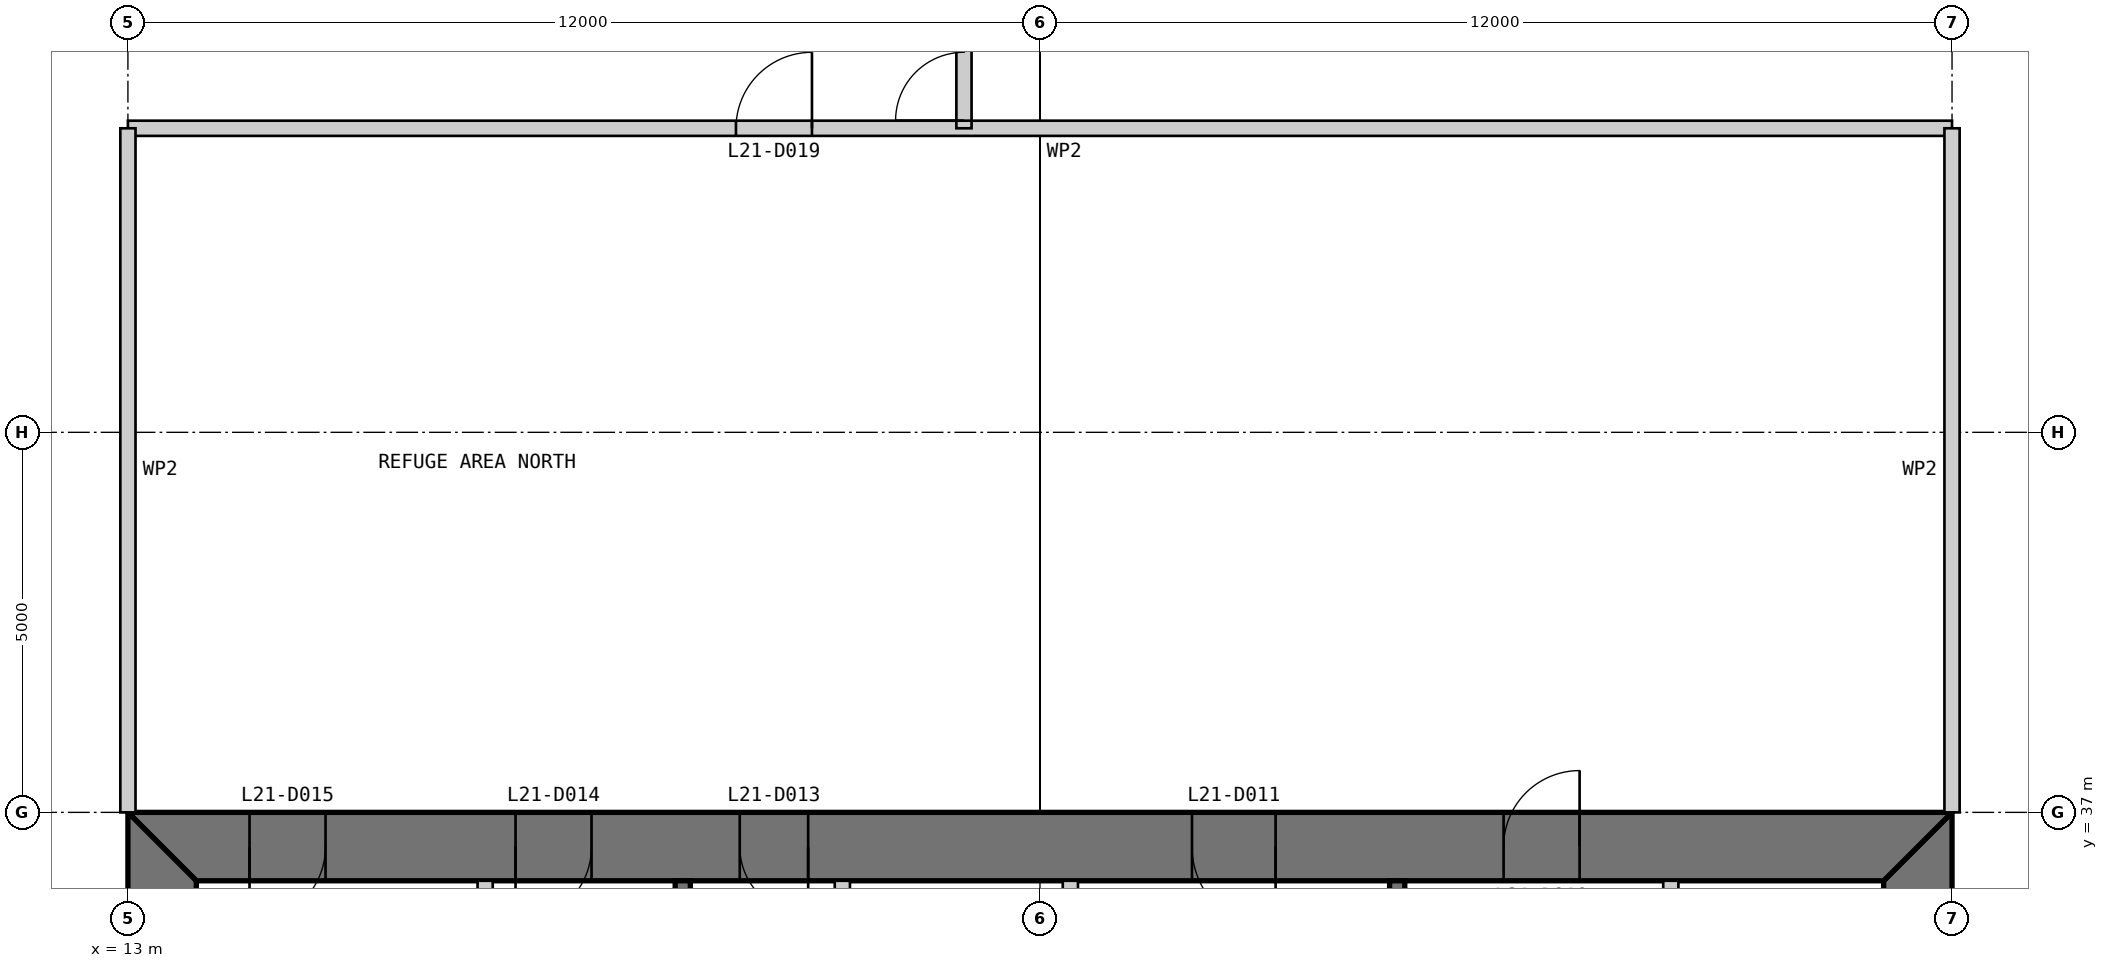
"""IFC4 building model, lengths in metres.
Left out: names, types, materials, properties, quantities, classifications, styles, units other than length and angle.
Written with IfcOpenShell. Run it as: python <this file> out.ifc"""

import sys

from ifc_helpers import new_model, si_unit, direction, frame, frame_2d, origin, place, context, subcontext, project, spatial, polyline, rectangle, outline, extrude, element, fill, save


model = new_model("IFC4")
c1 = context("Model", 3, precision=1e-05, world=origin(), true_north=direction((0.0, 1.0)))
c2 = subcontext(c1, "Body", "Model", "MODEL_VIEW")
j1 = project(units=[si_unit("LENGTHUNIT", "METRE"), si_unit("PLANEANGLEUNIT", "RADIAN")], contexts=[c1])
p1 = place(None, origin())
s1 = spatial("IfcSite", under=j1, at=p1, CompositionType="ELEMENT")
p2 = place(p1, origin())
s2 = spatial("IfcBuilding", under=s1, at=p2, CompositionType="ELEMENT")
p3 = place(p2, frame((0.0, 0.0, 91.0)))
s3 = spatial("IfcBuildingStorey", under=s2, at=p3, CompositionType="ELEMENT", Elevation=91.0)
p4 = place(p3, frame((36.55, 13.9, 0.0), z_axis=(0.0, 0.0, 1.0), x_axis=(0.0, 1.0, 0.0)))
e1 = element("IfcWall", 1, at=p4, inside=s3, PredefinedType="SHEAR", context=c2, shape_type="SweptSolid", body=[
    extrude(outline(polyline([(-0.9, -0.45), (23.1, -0.45), (22.2, 0.45), (0.0, 0.45), (-0.9, -0.45)])), origin(), (0.0, 0.0, 1.0), 6.0),
])
p5 = place(p4, frame((20.2, 0.0, 0.0)))
e2 = element("IfcOpeningElement", 2, at=p5, cuts=e1, PredefinedType="OPENING", context=c2, shape_type="SweptSolid", body=[
    extrude(rectangle(XDim=1.0, YDim=2.2, at=frame_2d((0.5, 1.1))), frame((0.0, 0.46, 0.0), z_axis=(0.0, -1.0, 0.0), x_axis=(1.0, 0.0, 0.0)), (0.0, 0.0, 1.0), 0.92),
])
p6 = place(p4, frame((17.25, 0.0, 0.0)))
e3 = element("IfcOpeningElement", 3, at=p6, cuts=e1, PredefinedType="OPENING", context=c2, shape_type="SweptSolid", body=[
    extrude(rectangle(XDim=0.9, YDim=2.2, at=frame_2d((0.45, 1.1))), frame((0.0, 0.46, 0.0), z_axis=(0.0, -1.0, 0.0), x_axis=(1.0, 0.0, 0.0)), (0.0, 0.0, 1.0), 0.92),
])
p7 = place(p3, frame((37.0, 36.55, 0.0), z_axis=(0.0, 0.0, 1.0), x_axis=(-1.0, 0.0, 0.0)))
e4 = element("IfcWall", 4, at=p7, inside=s3, PredefinedType="SHEAR", context=c2, shape_type="SweptSolid", body=[
    extrude(outline(polyline([(0.0, -0.45), (24.0, -0.45), (23.1, 0.45), (0.9, 0.45), (0.0, -0.45)])), origin(), (0.0, 0.0, 1.0), 6.0),
])
p8 = place(p7, frame((4.9, 0.0, 0.0)))
e5 = element("IfcOpeningElement", 5, at=p8, cuts=e4, PredefinedType="OPENING", context=c2, shape_type="SweptSolid", body=[
    extrude(rectangle(XDim=1.0, YDim=2.2, at=frame_2d((0.5, 1.1))), frame((0.0, 0.46, 0.0), z_axis=(0.0, -1.0, 0.0), x_axis=(1.0, 0.0, 0.0)), (0.0, 0.0, 1.0), 0.92),
])
p9 = place(p7, frame((8.9, 0.0, 0.0)))
e6 = element("IfcOpeningElement", 6, at=p9, cuts=e4, PredefinedType="OPENING", context=c2, shape_type="SweptSolid", body=[
    extrude(rectangle(XDim=1.1, YDim=2.2, at=frame_2d((0.55, 1.1))), frame((0.0, 0.46, 0.0), z_axis=(0.0, -1.0, 0.0), x_axis=(1.0, 0.0, 0.0)), (0.0, 0.0, 1.0), 0.92),
])
p10 = place(p7, frame((15.05, 0.0, 0.0)))
e7 = element("IfcOpeningElement", 7, at=p10, cuts=e4, PredefinedType="OPENING", context=c2, shape_type="SweptSolid", body=[
    extrude(rectangle(XDim=0.9, YDim=2.2, at=frame_2d((0.45, 1.1))), frame((0.0, 0.46, 0.0), z_axis=(0.0, -1.0, 0.0), x_axis=(1.0, 0.0, 0.0)), (0.0, 0.0, 1.0), 0.92),
])
p11 = place(p7, frame((17.9, 0.0, 0.0)))
e8 = element("IfcOpeningElement", 8, at=p11, cuts=e4, PredefinedType="OPENING", context=c2, shape_type="SweptSolid", body=[
    extrude(rectangle(XDim=1.0, YDim=2.2, at=frame_2d((0.5, 1.1))), frame((0.0, 0.46, 0.0), z_axis=(0.0, -1.0, 0.0), x_axis=(1.0, 0.0, 0.0)), (0.0, 0.0, 1.0), 0.92),
])
p12 = place(p7, frame((21.4, 0.0, 0.0)))
e9 = element("IfcOpeningElement", 9, at=p12, cuts=e4, PredefinedType="OPENING", context=c2, shape_type="SweptSolid", body=[
    extrude(rectangle(XDim=1.0, YDim=2.2, at=frame_2d((0.5, 1.1))), frame((0.0, 0.46, 0.0), z_axis=(0.0, -1.0, 0.0), x_axis=(1.0, 0.0, 0.0)), (0.0, 0.0, 1.0), 0.92),
])
p13 = place(p3, frame((13.45, 36.1, 0.0), z_axis=(0.0, 0.0, 1.0), x_axis=(0.0, -1.0, 0.0)))
e10 = element("IfcWall", 10, at=p13, inside=s3, PredefinedType="SHEAR", context=c2, shape_type="SweptSolid", body=[
    extrude(outline(polyline([(-0.9, -0.45), (23.1, -0.45), (22.2, 0.45), (0.0, 0.45), (-0.9, -0.45)])), origin(), (0.0, 0.0, 1.0), 6.0),
])
p14 = place(p13, frame((20.2, 0.0, 0.0)))
e11 = element("IfcOpeningElement", 11, at=p14, cuts=e10, PredefinedType="OPENING", context=c2, shape_type="SweptSolid", body=[
    extrude(rectangle(XDim=1.0, YDim=2.2, at=frame_2d((0.5, 1.1))), frame((0.0, 0.46, 0.0), z_axis=(0.0, -1.0, 0.0), x_axis=(1.0, 0.0, 0.0)), (0.0, 0.0, 1.0), 0.92),
])
p15 = place(p13, frame((17.25, 0.0, 0.0)))
e12 = element("IfcOpeningElement", 12, at=p15, cuts=e10, PredefinedType="OPENING", context=c2, shape_type="SweptSolid", body=[
    extrude(rectangle(XDim=0.9, YDim=2.2, at=frame_2d((0.45, 1.1))), frame((0.0, 0.46, 0.0), z_axis=(0.0, -1.0, 0.0), x_axis=(1.0, 0.0, 0.0)), (0.0, 0.0, 1.0), 0.92),
])
p16 = place(p3, frame((33.3, 36.1, 0.0), z_axis=(0.0, 0.0, 1.0), x_axis=(0.0, -1.0, 0.0)))
e13 = element("IfcWall", 13, at=p16, inside=s3, PredefinedType="PARTITIONING", context=c2, shape_type="SweptSolid", body=[
    extrude(rectangle(XDim=16.1, YDim=0.2, at=frame_2d((8.05, 0.0))), origin(), (0.0, 0.0, 1.0), 5.8),
])
p17 = place(p16, frame((4.1, 0.0, 0.0)))
e14 = element("IfcOpeningElement", 14, at=p17, cuts=e13, PredefinedType="OPENING", context=c2, shape_type="SweptSolid", body=[
    extrude(rectangle(XDim=0.9, YDim=2.2, at=frame_2d((0.45, 1.1))), frame((0.0, 0.11, 0.0), z_axis=(0.0, -1.0, 0.0), x_axis=(1.0, 0.0, 0.0)), (0.0, 0.0, 1.0), 0.22),
])
p18 = place(p3, frame((29.7, 36.1, 0.0), z_axis=(0.0, 0.0, 1.0), x_axis=(0.0, -1.0, 0.0)))
e15 = element("IfcWall", 15, at=p18, inside=s3, PredefinedType="SOLIDWALL", context=c2, shape_type="SweptSolid", body=[
    extrude(rectangle(XDim=16.1, YDim=0.2, at=frame_2d((8.05, 0.0))), origin(), (0.0, 0.0, 1.0), 5.8),
])
p19 = place(p3, frame((25.4, 36.1, 0.0), z_axis=(0.0, 0.0, 1.0), x_axis=(0.0, -1.0, 0.0)))
e16 = element("IfcWall", 16, at=p19, inside=s3, PredefinedType="PARTITIONING", context=c2, shape_type="SweptSolid", body=[
    extrude(rectangle(XDim=3.3, YDim=0.2, at=frame_2d((1.65, 0.0))), origin(), (0.0, 0.0, 1.0), 5.8),
])
p20 = place(p19, frame((0.9, 0.0, 0.0)))
e17 = element("IfcOpeningElement", 17, at=p20, cuts=e16, PredefinedType="OPENING", context=c2, shape_type="SweptSolid", body=[
    extrude(rectangle(XDim=1.1, YDim=2.2, at=frame_2d((0.55, 1.1))), frame((0.0, 0.11, 0.0), z_axis=(0.0, -1.0, 0.0), x_axis=(1.0, 0.0, 0.0)), (0.0, 0.0, 1.0), 0.22),
])
p21 = place(p3, frame((22.4, 36.1, 0.0), z_axis=(0.0, 0.0, 1.0), x_axis=(0.0, -1.0, 0.0)))
e18 = element("IfcWall", 18, at=p21, inside=s3, PredefinedType="PARTITIONING", context=c2, shape_type="SweptSolid", body=[
    extrude(rectangle(XDim=3.3, YDim=0.2, at=frame_2d((1.65, 0.0))), origin(), (0.0, 0.0, 1.0), 5.8),
])
p22 = place(p3, frame((20.3, 36.1, 0.0), z_axis=(0.0, 0.0, 1.0), x_axis=(0.0, -1.0, 0.0)))
e19 = element("IfcWall", 19, at=p22, inside=s3, PredefinedType="SOLIDWALL", context=c2, shape_type="SweptSolid", body=[
    extrude(rectangle(XDim=6.1, YDim=0.2, at=frame_2d((3.05, 0.0))), origin(), (0.0, 0.0, 1.0), 5.8),
])
p23 = place(p3, frame((17.7, 36.1, 0.0), z_axis=(0.0, 0.0, 1.0), x_axis=(0.0, -1.0, 0.0)))
e20 = element("IfcWall", 20, at=p23, inside=s3, PredefinedType="PARTITIONING", context=c2, shape_type="SweptSolid", body=[
    extrude(rectangle(XDim=6.1, YDim=0.2, at=frame_2d((3.05, 0.0))), origin(), (0.0, 0.0, 1.0), 5.8),
])
p24 = place(p3, frame((13.0, 46.0, 0.0), z_axis=(0.0, 0.0, 1.0), x_axis=(1.0, 0.0, 0.0)))
e21 = element("IfcWall", 21, at=p24, inside=s3, PredefinedType="PARTITIONING", context=c2, shape_type="SweptSolid", body=[
    extrude(rectangle(XDim=24.0, YDim=0.2, at=frame_2d((12.0, 0.0))), origin(), (0.0, 0.0, 1.0), 5.8),
])
p25 = place(p24, frame((8.0, 0.0, 0.0)))
e22 = element("IfcOpeningElement", 22, at=p25, cuts=e21, PredefinedType="OPENING", context=c2, shape_type="SweptSolid", body=[
    extrude(rectangle(XDim=1.0, YDim=2.2, at=frame_2d((0.5, 1.1))), frame((0.0, 0.11, 0.0), z_axis=(0.0, -1.0, 0.0), x_axis=(1.0, 0.0, 0.0)), (0.0, 0.0, 1.0), 0.22),
])
for number, where, z_axis, x_axis in (
    (23, (37.0, 46.0, 0.0), (0.0, 0.0, 1.0), (0.0, -1.0, 0.0)),
    (24, (13.0, 37.0, 0.0), (0.0, 0.0, 1.0), (0.0, 1.0, 0.0)),
):
    element("IfcWall", number, at=place(p3, frame(where, z_axis=z_axis, x_axis=x_axis)), inside=s3, PredefinedType="PARTITIONING", context=c2, shape_type="SweptSolid", body=[
        extrude(rectangle(XDim=9.0, YDim=0.2, at=frame_2d((4.5, 0.0))), origin(), (0.0, 0.0, 1.0), 4.853),
    ])
p26 = place(p3, frame((24.0, 46.0, 0.0), z_axis=(0.0, 0.0, 1.0), x_axis=(0.0, 1.0, 0.0)))
e25 = element("IfcWall", 25, at=p26, inside=s3, PredefinedType="PARTITIONING", context=c2, shape_type="SweptSolid", body=[
    extrude(rectangle(XDim=2.0, YDim=0.2, at=frame_2d((1.0, 0.0))), origin(), (0.0, 0.0, 1.0), 5.8),
])
p27 = place(p26, frame((0.1, 0.0, 0.0)))
e26 = element("IfcOpeningElement", 26, at=p27, cuts=e25, PredefinedType="OPENING", context=c2, shape_type="SweptSolid", body=[
    extrude(rectangle(XDim=1.8, YDim=2.4, at=frame_2d((0.9, 1.2))), frame((0.0, 0.11, 0.0), z_axis=(0.0, -1.0, 0.0), x_axis=(1.0, 0.0, 0.0)), (0.0, 0.0, 1.0), 0.22),
])
p28 = place(p8, frame((1.0, 0.0, 0.0), z_axis=(0.0, 0.0, 1.0), x_axis=(-1.0, 0.0, 0.0)))
e27 = element("IfcDoor", 27, at=p28, inside=s3, OperationType="SINGLE_SWING_RIGHT", PredefinedType="DOOR", context=c2, shape_type="SweptSolid", body=[
    extrude(rectangle(XDim=1.0, YDim=2.2, at=frame_2d((0.5, 1.1))), frame((0.0, 0.025, 0.0), z_axis=(0.0, -1.0, 0.0), x_axis=(1.0, 0.0, 0.0)), (0.0, 0.0, 1.0), 0.05),
    extrude(outline(polyline([(0.0, 0.0), (0.04, 0.0), (0.04, 2.16), (0.96, 2.16), (0.96, 0.0), (1.0, 0.0), (1.0, 2.2), (0.0, 2.2), (0.0, 0.0)])), frame((0.0, 0.3, 0.0), z_axis=(0.0, -1.0, 0.0), x_axis=(1.0, 0.0, 0.0)), (0.0, 0.0, 1.0), 0.6),
])
fill(e5, e27)
p29 = place(p9, origin())
e28 = element("IfcDoor", 28, at=p29, inside=s3, OperationType="SINGLE_SWING_LEFT", PredefinedType="DOOR", context=c2, shape_type="SweptSolid", body=[
    extrude(rectangle(XDim=1.1, YDim=2.2, at=frame_2d((0.55, 1.1))), frame((0.0, 0.025, 0.0), z_axis=(0.0, -1.0, 0.0), x_axis=(1.0, 0.0, 0.0)), (0.0, 0.0, 1.0), 0.05),
    extrude(outline(polyline([(0.0, 0.0), (0.04, 0.0), (0.04, 2.16), (1.06, 2.16), (1.06, 0.0), (1.1, 0.0), (1.1, 2.2), (0.0, 2.2), (0.0, 0.0)])), frame((0.0, 0.3, 0.0), z_axis=(0.0, -1.0, 0.0), x_axis=(1.0, 0.0, 0.0)), (0.0, 0.0, 1.0), 0.6),
])
fill(e6, e28)
p30 = place(p10, origin())
e29 = element("IfcDoor", 29, at=p30, inside=s3, OperationType="SINGLE_SWING_LEFT", PredefinedType="DOOR", context=c2, shape_type="SweptSolid", body=[
    extrude(rectangle(XDim=0.9, YDim=2.2, at=frame_2d((0.45, 1.1))), frame((0.0, 0.025, 0.0), z_axis=(0.0, -1.0, 0.0), x_axis=(1.0, 0.0, 0.0)), (0.0, 0.0, 1.0), 0.05),
    extrude(outline(polyline([(0.0, 0.0), (0.04, 0.0), (0.04, 2.16), (0.86, 2.16), (0.86, 0.0), (0.9, 0.0), (0.9, 2.2), (0.0, 2.2), (0.0, 0.0)])), frame((0.0, 0.3, 0.0), z_axis=(0.0, -1.0, 0.0), x_axis=(1.0, 0.0, 0.0)), (0.0, 0.0, 1.0), 0.6),
])
fill(e7, e29)
p31 = place(p11, origin())
e30 = element("IfcDoor", 30, at=p31, inside=s3, OperationType="SINGLE_SWING_RIGHT", PredefinedType="DOOR", context=c2, shape_type="SweptSolid", body=[
    extrude(rectangle(XDim=1.0, YDim=2.2, at=frame_2d((0.5, 1.1))), frame((0.0, 0.025, 0.0), z_axis=(0.0, -1.0, 0.0), x_axis=(1.0, 0.0, 0.0)), (0.0, 0.0, 1.0), 0.05),
    extrude(outline(polyline([(0.0, 0.0), (0.04, 0.0), (0.04, 2.16), (0.96, 2.16), (0.96, 0.0), (1.0, 0.0), (1.0, 2.2), (0.0, 2.2), (0.0, 0.0)])), frame((0.0, 0.3, 0.0), z_axis=(0.0, -1.0, 0.0), x_axis=(1.0, 0.0, 0.0)), (0.0, 0.0, 1.0), 0.6),
])
fill(e8, e30)
p32 = place(p12, origin())
e31 = element("IfcDoor", 31, at=p32, inside=s3, OperationType="SINGLE_SWING_RIGHT", PredefinedType="DOOR", context=c2, shape_type="SweptSolid", body=[
    extrude(rectangle(XDim=1.0, YDim=2.2, at=frame_2d((0.5, 1.1))), frame((0.0, 0.025, 0.0), z_axis=(0.0, -1.0, 0.0), x_axis=(1.0, 0.0, 0.0)), (0.0, 0.0, 1.0), 0.05),
    extrude(outline(polyline([(0.0, 0.0), (0.04, 0.0), (0.04, 2.16), (0.96, 2.16), (0.96, 0.0), (1.0, 0.0), (1.0, 2.2), (0.0, 2.2), (0.0, 0.0)])), frame((0.0, 0.3, 0.0), z_axis=(0.0, -1.0, 0.0), x_axis=(1.0, 0.0, 0.0)), (0.0, 0.0, 1.0), 0.6),
])
fill(e9, e31)
p33 = place(p25, origin())
e32 = element("IfcDoor", 32, at=p33, inside=s3, OperationType="SINGLE_SWING_RIGHT", PredefinedType="DOOR", context=c2, shape_type="SweptSolid", body=[
    extrude(rectangle(XDim=1.0, YDim=2.2, at=frame_2d((0.5, 1.1))), frame((0.0, 0.025, 0.0), z_axis=(0.0, -1.0, 0.0), x_axis=(1.0, 0.0, 0.0)), (0.0, 0.0, 1.0), 0.05),
])
fill(e22, e32)
p34 = place(p27, origin())
e33 = element("IfcDoor", 33, at=p34, inside=s3, OperationType="DOUBLE_DOOR_SINGLE_SWING", PredefinedType="DOOR", context=c2, shape_type="SweptSolid", body=[
    extrude(rectangle(XDim=1.8, YDim=2.4, at=frame_2d((0.9, 1.2))), frame((0.0, 0.025, 0.0), z_axis=(0.0, -1.0, 0.0), x_axis=(1.0, 0.0, 0.0)), (0.0, 0.0, 1.0), 0.05),
])
fill(e26, e33)
save(model, sys.argv[1])
